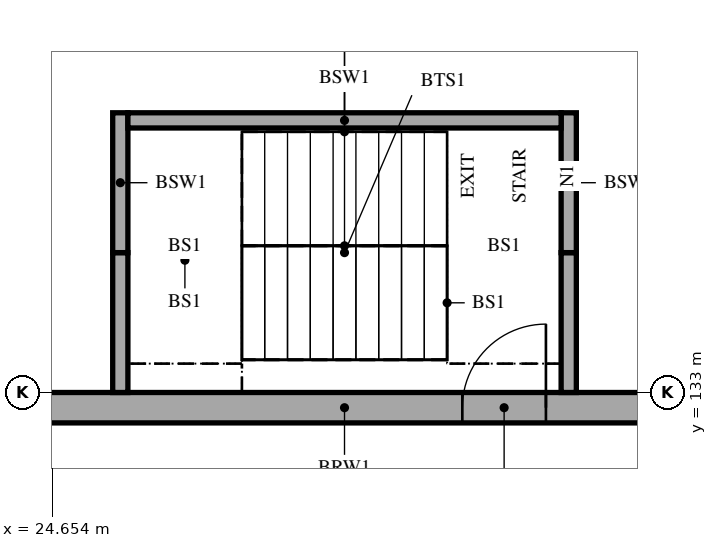
"""IFC4 building model, lengths in metres.
Left out: names, types, materials, properties, quantities, classifications, styles, units other than length and angle.
Written with IfcOpenShell. Run it as: python <this file> out.ifc"""

import sys

from ifc_helpers import new_model, si_unit, direction, frame, frame_2d, origin, place, context, subcontext, project, spatial, rectangle, extrude, element, fill, save


model = new_model("IFC4")
c1 = context("Model", 3, precision=1e-05, world=origin(), true_north=direction((0.0, 1.0)))
c2 = subcontext(c1, "Body", "Model", "MODEL_VIEW")
j1 = project(units=[si_unit("LENGTHUNIT", "METRE"), si_unit("PLANEANGLEUNIT", "RADIAN")], contexts=[c1])
p1 = place(None, origin())
s1 = spatial("IfcSite", under=j1, at=p1, CompositionType="ELEMENT")
p2 = place(p1, origin())
s2 = spatial("IfcBuilding", under=s1, at=p2, CompositionType="ELEMENT")
p3 = place(p2, frame((0.0, 0.0, -8.4)))
s3 = spatial("IfcBuildingStorey", under=s2, at=p3, CompositionType="ELEMENT", Elevation=-8.4)
p4 = place(p3, frame((24.4, 132.8, 0.0), z_axis=(0.0, 0.0, 1.0), x_axis=(1.0, 0.0, 0.0)))
e1 = element("IfcWall", 1, at=p4, inside=s3, PredefinedType="SOLIDWALL", context=c2, shape_type="SweptSolid", body=[
    extrude(rectangle(XDim=8.2, YDim=0.4, at=frame_2d((4.1, 0.0))), origin(), (0.0, 0.0, 1.0), 4.2),
])
p5 = place(p4, frame((5.65, 0.0, 0.0)))
e2 = element("IfcOpeningElement", 2, at=p5, cuts=e1, PredefinedType="OPENING", context=c2, shape_type="SweptSolid", body=[
    extrude(rectangle(XDim=1.1, YDim=2.1, at=frame_2d((0.55, 1.05))), frame((0.0, 0.21, 0.0), z_axis=(0.0, -1.0, 0.0), x_axis=(1.0, 0.0, 0.0)), (0.0, 0.0, 1.0), 0.42),
])
p6 = place(p3, frame((31.45, 133.0, 0.0), z_axis=(0.0, 0.0, 1.0), x_axis=(0.0, 1.0, 0.0)))
e3 = element("IfcWall", 3, at=p6, inside=s3, PredefinedType="SOLIDWALL", context=c2, shape_type="SweptSolid", body=[
    extrude(rectangle(XDim=1.84, YDim=0.2, at=frame_2d((0.92, 0.0))), origin(), (0.0, 0.0, 1.0), 4.2),
])
p7 = place(p3, frame((31.45, 134.84, 0.0), z_axis=(0.0, 0.0, 1.0), x_axis=(0.0, 1.0, 0.0)))
e4 = element("IfcWall", 4, at=p7, inside=s3, PredefinedType="SOLIDWALL", context=c2, shape_type="SweptSolid", body=[
    extrude(rectangle(XDim=1.84, YDim=0.2, at=frame_2d((0.92, 0.0))), origin(), (0.0, 0.0, 1.0), 4.2),
])
p8 = place(p3, frame((25.55, 133.0, 0.0), z_axis=(0.0, 0.0, 1.0), x_axis=(0.0, 1.0, 0.0)))
e5 = element("IfcWall", 5, at=p8, inside=s3, PredefinedType="SOLIDWALL", context=c2, shape_type="SweptSolid", body=[
    extrude(rectangle(XDim=1.84, YDim=0.2, at=frame_2d((0.92, 0.0))), origin(), (0.0, 0.0, 1.0), 4.2),
])
p9 = place(p3, frame((25.55, 134.84, 0.0), z_axis=(0.0, 0.0, 1.0), x_axis=(0.0, 1.0, 0.0)))
e6 = element("IfcWall", 6, at=p9, inside=s3, PredefinedType="SOLIDWALL", context=c2, shape_type="SweptSolid", body=[
    extrude(rectangle(XDim=1.84, YDim=0.2, at=frame_2d((0.92, 0.0))), origin(), (0.0, 0.0, 1.0), 4.2),
])
p10 = place(p3, frame((31.35, 136.58, 0.0), z_axis=(0.0, 0.0, 1.0), x_axis=(-1.0, 0.0, 0.0)))
e7 = element("IfcWall", 7, at=p10, inside=s3, PredefinedType="SOLIDWALL", context=c2, shape_type="SweptSolid", body=[
    extrude(rectangle(XDim=5.7, YDim=0.2, at=frame_2d((2.85, 0.0))), origin(), (0.0, 0.0, 1.0), 4.2),
])
p11 = place(p5, origin())
e8 = element("IfcDoor", 8, at=p11, inside=s3, OperationType="SINGLE_SWING_RIGHT", PredefinedType="DOOR", context=c2, shape_type="SweptSolid", body=[
    extrude(rectangle(XDim=1.1, YDim=2.1, at=frame_2d((0.55, 1.05))), frame((0.0, 0.025, 0.0), z_axis=(0.0, -1.0, 0.0), x_axis=(1.0, 0.0, 0.0)), (0.0, 0.0, 1.0), 0.05),
])
fill(e2, e8)
save(model, sys.argv[1])
